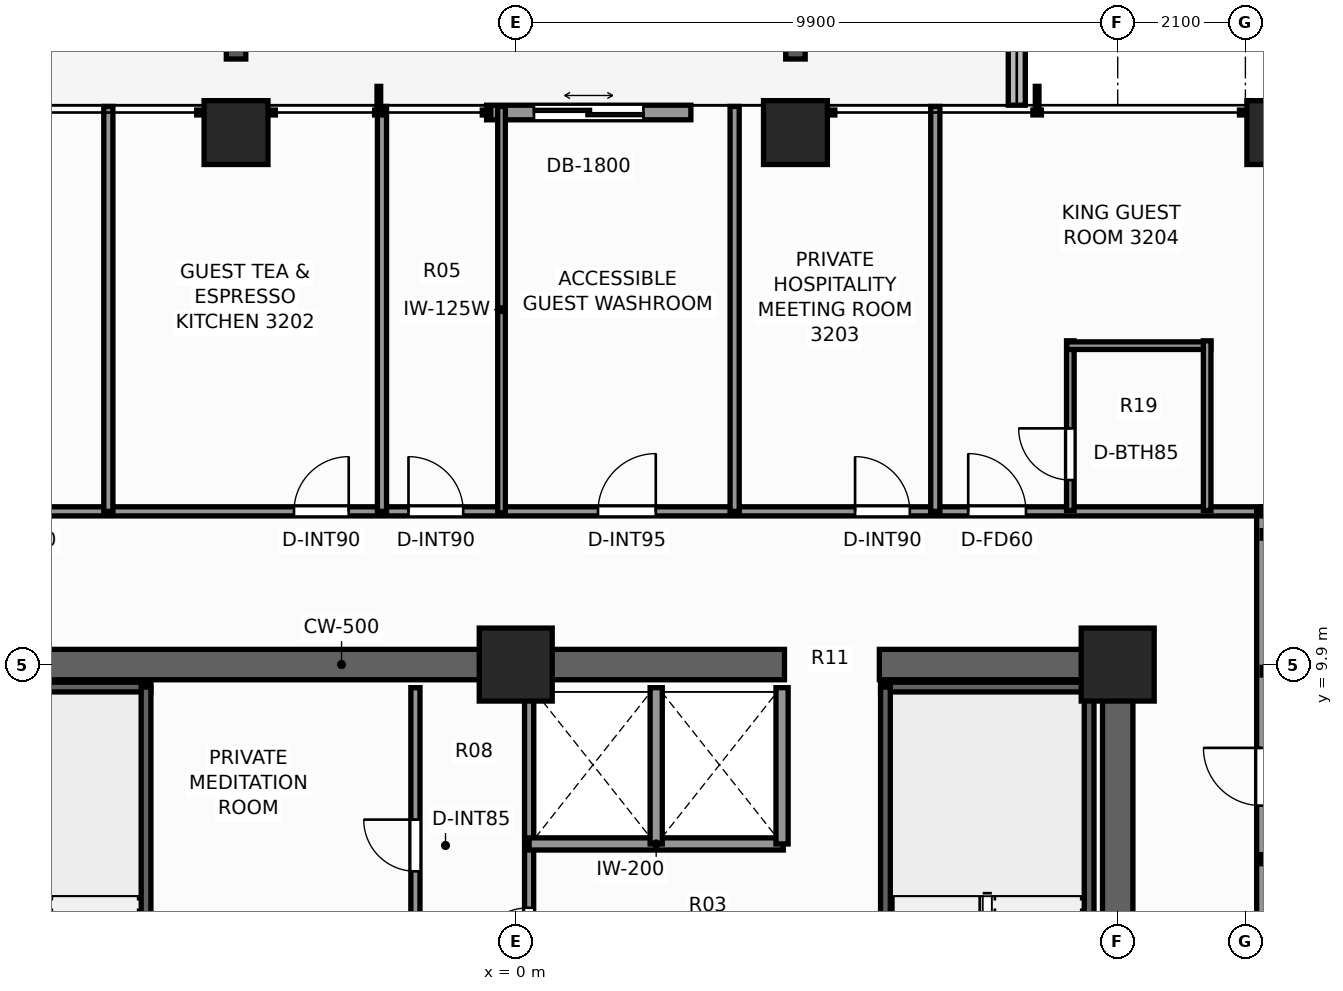
"""IFC4 building model, lengths in metres.
Left out: names, types, materials, properties, quantities, classifications, styles, units other than length and angle.
Written with IfcOpenShell. Run it as: python <this file> out.ifc"""

import sys

from ifc_helpers import new_model, si_unit, direction, frame, frame_2d, origin, origin_2d, place, context, subcontext, project, spatial, rectangle, extrude, element, fill, save


model = new_model("IFC4")
c1 = context("Model", 3, precision=1e-05, world=origin(), true_north=direction((0.0, 1.0)))
c2 = subcontext(c1, "Body", "Model", "MODEL_VIEW")
j1 = project(units=[si_unit("LENGTHUNIT", "METRE"), si_unit("PLANEANGLEUNIT", "RADIAN")], contexts=[c1])
p1 = place(None, origin())
s1 = spatial("IfcSite", under=j1, at=p1, CompositionType="ELEMENT")
p2 = place(p1, origin())
s2 = spatial("IfcBuilding", under=s1, at=p2, CompositionType="ELEMENT")
p3 = place(p2, frame((0.0, 0.0, 111.8)))
s3 = spatial("IfcBuildingStorey", under=s2, at=p3, CompositionType="ELEMENT", Elevation=111.8)
p4 = place(p3, frame((-10.15, 9.9, 0.0), z_axis=(0.0, 0.0, 1.0), x_axis=(1.0, 0.0, 0.0)))
e1 = element("IfcWall", 1, at=p4, inside=s3, PredefinedType="SHEAR", context=c2, shape_type="SweptSolid", body=[
    extrude(rectangle(XDim=14.57, YDim=0.5, at=frame_2d((7.285, 0.0))), origin(), (0.0, 0.0, 1.0), 3.3),
])
p5 = place(p3, frame((5.98, 9.9, 0.0), z_axis=(0.0, 0.0, 1.0), x_axis=(1.0, 0.0, 0.0)))
e2 = element("IfcWall", 2, at=p5, inside=s3, PredefinedType="SHEAR", context=c2, shape_type="SweptSolid", body=[
    extrude(rectangle(XDim=4.17, YDim=0.5, at=frame_2d((2.085, 0.0))), origin(), (0.0, 0.0, 1.0), 3.3),
])
p6 = place(p3, frame((9.9, -3.7, 0.0), z_axis=(0.0, 0.0, 1.0), x_axis=(0.0, 1.0, 0.0)))
e3 = element("IfcWall", 3, at=p6, inside=s3, PredefinedType="SHEAR", context=c2, shape_type="SweptSolid", body=[
    extrude(rectangle(XDim=13.35, YDim=0.5, at=frame_2d((6.675, 0.0))), origin(), (0.0, 0.0, 1.0), 3.3),
])
p7 = place(p6, frame((0.35, 0.0, 0.0)))
e4 = element("IfcOpeningElement", 4, at=p7, cuts=e3, PredefinedType="OPENING", context=c2, shape_type="SweptSolid", body=[
    extrude(rectangle(XDim=1.1, YDim=2.2, at=frame_2d((0.55, 1.1))), frame((0.0, 0.26, 0.0), z_axis=(0.0, -1.0, 0.0), x_axis=(1.0, 0.0, 0.0)), (0.0, 0.0, 1.0), 0.52),
])
for number, where, z_axis, x_axis in (
    (5, (9.9, 9.9, 0.0), (0.0, 0.0, 1.0), (1.0, 0.0, 0.0)),
    (6, (0.0, 9.9, 0.0), (0.0, 0.0, 1.0), (1.0, 0.0, 0.0)),
):
    element("IfcColumn", number, at=place(p3, frame(where, z_axis=z_axis, x_axis=x_axis)), inside=s3, PredefinedType="COLUMN", context=c2, shape_type="SweptSolid", body=[
        extrude(rectangle(XDim=1.2, YDim=1.2, at=origin_2d()), origin(), (0.0, 0.0, 1.0), 3.3),
    ])
for number, where, z_axis, x_axis in (
    (7, (-4.6, 18.65, 0.0), (0.0, 0.0, 1.0), (1.0, 0.0, 0.0)),
    (8, (4.6, 18.65, 0.0), (0.0, 0.0, 1.0), (1.0, 0.0, 0.0)),
    (9, (12.55, 18.65, 0.0), (0.0, 0.0, 1.0), (1.0, 0.0, 0.0)),
):
    element("IfcColumn", number, at=place(p3, frame(where, z_axis=z_axis, x_axis=x_axis)), inside=s3, PredefinedType="COLUMN", context=c2, shape_type="SweptSolid", body=[
        extrude(rectangle(XDim=1.05, YDim=1.05, at=origin_2d()), origin(), (0.0, 0.0, 1.0), 3.3),
    ])
p8 = place(p3, frame((8.24, 19.1, -0.04), z_axis=(0.0, 0.0, 1.0), x_axis=(0.0, 1.0, 0.0)))
e10 = element("IfcWall", 10, at=p8, inside=s3, PredefinedType="PARAPET", context=c2, shape_type="SweptSolid", body=[
    extrude(rectangle(XDim=3.42, YDim=0.28, at=frame_2d((1.71, 0.0))), origin(), (0.0, 0.0, 1.0), 0.42),
])
p9 = place(p3, frame((-0.48, 18.98, 0.0), z_axis=(0.0, 0.0, 1.0), x_axis=(1.0, 0.0, 0.0)))
e11 = element("IfcWall", 11, at=p9, inside=s3, PredefinedType="STANDARD", context=c2, shape_type="SweptSolid", body=[
    extrude(rectangle(XDim=3.36, YDim=0.24, at=frame_2d((1.68, 0.0))), origin(), (0.0, 0.0, 1.0), 3.08),
])
p10 = place(p9, frame((0.78, 0.0, 0.0)))
e12 = element("IfcOpeningElement", 12, at=p10, cuts=e11, PredefinedType="OPENING", context=c2, shape_type="SweptSolid", body=[
    extrude(rectangle(XDim=1.8, YDim=2.2, at=frame_2d((0.9, 1.1))), frame((0.0, 0.13, 0.0), z_axis=(0.0, -1.0, 0.0), x_axis=(1.0, 0.0, 0.0)), (0.0, 0.0, 1.0), 0.26),
])
p11 = place(p3, frame((-9.52, 9.53, 0.0), z_axis=(0.0, 0.0, 1.0), x_axis=(1.0, 0.0, 0.0)))
e13 = element("IfcWall", 13, at=p11, inside=s3, PredefinedType="SHEAR", context=c2, shape_type="SweptSolid", body=[
    extrude(rectangle(XDim=3.52, YDim=0.16, at=frame_2d((1.76, 0.0))), origin(), (0.0, 0.0, 1.0), 3.3),
])
p12 = place(p3, frame((-6.08, 1.97, 0.0), z_axis=(0.0, 0.0, 1.0), x_axis=(0.0, 1.0, 0.0)))
e14 = element("IfcWall", 14, at=p12, inside=s3, PredefinedType="SHEAR", context=c2, shape_type="SweptSolid", body=[
    extrude(rectangle(XDim=7.56, YDim=0.16, at=frame_2d((3.78, 0.0))), origin(), (0.0, 0.0, 1.0), 3.3),
])
p13 = place(p3, frame((6.0, 9.53, 0.0), z_axis=(0.0, 0.0, 1.0), x_axis=(1.0, 0.0, 0.0)))
e15 = element("IfcWall", 15, at=p13, inside=s3, PredefinedType="SHEAR", context=c2, shape_type="SweptSolid", body=[
    extrude(rectangle(XDim=3.52, YDim=0.16, at=frame_2d((1.76, 0.0))), origin(), (0.0, 0.0, 1.0), 3.3),
])
for number, where, z_axis, x_axis in (
    (16, (6.08, 1.97, 0.0), (0.0, 0.0, 1.0), (0.0, 1.0, 0.0)),
    (17, (9.43, 1.97, 0.0), (0.0, 0.0, 1.0), (0.0, 1.0, 0.0)),
):
    element("IfcWall", number, at=place(p3, frame(where, z_axis=z_axis, x_axis=x_axis)), inside=s3, PredefinedType="SHEAR", context=c2, shape_type="SweptSolid", body=[
        extrude(rectangle(XDim=7.56, YDim=0.16, at=frame_2d((3.78, 0.0))), origin(), (0.0, 0.0, 1.0), 3.3),
    ])
p14 = place(p3, frame((0.22, 4.3, 0.0), z_axis=(0.0, 0.0, 1.0), x_axis=(0.0, 1.0, 0.0)))
e18 = element("IfcWall", 18, at=p14, inside=s3, PredefinedType="PARTITIONING", context=c2, shape_type="SweptSolid", body=[
    extrude(rectangle(XDim=5.22, YDim=0.15, at=frame_2d((2.61, 0.0))), origin(), (0.0, 0.0, 1.0), 3.08),
])
p15 = place(p14, frame((0.65, 0.0, 0.0)))
e19 = element("IfcOpeningElement", 19, at=p15, cuts=e18, PredefinedType="OPENING", context=c2, shape_type="SweptSolid", body=[
    extrude(rectangle(XDim=0.95, YDim=2.06, at=frame_2d((0.475, 1.03))), frame((0.0, 0.085, 0.0), z_axis=(0.0, -1.0, 0.0), x_axis=(1.0, 0.0, 0.0)), (0.0, 0.0, 1.0), 0.17),
])
p16 = place(p3, frame((-1.65, 4.3, 0.0), z_axis=(0.0, 0.0, 1.0), x_axis=(0.0, 1.0, 0.0)))
e20 = element("IfcWall", 20, at=p16, inside=s3, PredefinedType="PARTITIONING", context=c2, shape_type="SweptSolid", body=[
    extrude(rectangle(XDim=5.22, YDim=0.15, at=frame_2d((2.61, 0.0))), origin(), (0.0, 0.0, 1.0), 3.08),
])
p17 = place(p16, frame((2.2, 0.0, 0.0)))
e21 = element("IfcOpeningElement", 21, at=p17, cuts=e20, PredefinedType="OPENING", context=c2, shape_type="SweptSolid", body=[
    extrude(rectangle(XDim=0.85, YDim=2.03, at=frame_2d((0.425, 1.015))), frame((0.0, 0.085, 0.0), z_axis=(0.0, -1.0, 0.0), x_axis=(1.0, 0.0, 0.0)), (0.0, 0.0, 1.0), 0.17),
])
p18 = place(p16, frame((0.25, 0.0, 0.0)))
e22 = element("IfcOpeningElement", 22, at=p18, cuts=e20, PredefinedType="OPENING", context=c2, shape_type="SweptSolid", body=[
    extrude(rectangle(XDim=0.85, YDim=2.03, at=frame_2d((0.425, 1.015))), frame((0.0, 0.085, 0.0), z_axis=(0.0, -1.0, 0.0), x_axis=(1.0, 0.0, 0.0)), (0.0, 0.0, 1.0), 0.17),
])
p19 = place(p3, frame((0.22, 6.95, 0.0), z_axis=(0.0, 0.0, 1.0), x_axis=(1.0, 0.0, 0.0)))
e23 = element("IfcWall", 23, at=p19, inside=s3, PredefinedType="SOLIDWALL", context=c2, shape_type="SweptSolid", body=[
    extrude(rectangle(XDim=4.18, YDim=0.2, at=frame_2d((2.09, 0.0))), origin(), (0.0, 0.0, 1.0), 3.08),
])
for number, where, z_axis, x_axis in (
    (24, (4.38, 6.95, 0.0), (0.0, 0.0, 1.0), (0.0, 1.0, 0.0)),
    (25, (2.31, 6.95, 0.0), (0.0, 0.0, 1.0), (0.0, 1.0, 0.0)),
):
    element("IfcWall", number, at=place(p3, frame(where, z_axis=z_axis, x_axis=x_axis)), inside=s3, PredefinedType="SOLIDWALL", context=c2, shape_type="SweptSolid", body=[
        extrude(rectangle(XDim=2.57, YDim=0.2, at=frame_2d((1.285, 0.0))), origin(), (0.0, 0.0, 1.0), 3.08),
    ])
p20 = place(p3, frame((-12.42, 12.42, 0.0), z_axis=(0.0, 0.0, 1.0), x_axis=(1.0, 0.0, 0.0)))
e26 = element("IfcWall", 26, at=p20, inside=s3, PredefinedType="PARTITIONING", context=c2, shape_type="SweptSolid", body=[
    extrude(rectangle(XDim=24.68, YDim=0.15, at=frame_2d((12.34, 0.0))), origin(), (0.0, 0.0, 1.0), 2.292),
])
p21 = place(p20, frame((3.781, 0.0, 0.0)))
e27 = element("IfcOpeningElement", 27, at=p21, cuts=e26, PredefinedType="OPENING", context=c2, shape_type="SweptSolid", body=[
    extrude(rectangle(XDim=0.9, YDim=2.06, at=frame_2d((0.45, 1.03))), frame((0.0, 0.085, 0.0), z_axis=(0.0, -1.0, 0.0), x_axis=(1.0, 0.0, 0.0)), (0.0, 0.0, 1.0), 0.17),
])
p22 = place(p20, frame((8.773, 0.0, 0.0)))
e28 = element("IfcOpeningElement", 28, at=p22, cuts=e26, PredefinedType="OPENING", context=c2, shape_type="SweptSolid", body=[
    extrude(rectangle(XDim=0.9, YDim=2.06, at=frame_2d((0.45, 1.03))), frame((0.0, 0.085, 0.0), z_axis=(0.0, -1.0, 0.0), x_axis=(1.0, 0.0, 0.0)), (0.0, 0.0, 1.0), 0.17),
])
p23 = place(p20, frame((10.656, 0.0, 0.0)))
e29 = element("IfcOpeningElement", 29, at=p23, cuts=e26, PredefinedType="OPENING", context=c2, shape_type="SweptSolid", body=[
    extrude(rectangle(XDim=0.9, YDim=2.06, at=frame_2d((0.45, 1.03))), frame((0.0, 0.085, 0.0), z_axis=(0.0, -1.0, 0.0), x_axis=(1.0, 0.0, 0.0)), (0.0, 0.0, 1.0), 0.17),
])
p24 = place(p20, frame((13.773, 0.0, 0.0)))
e30 = element("IfcOpeningElement", 30, at=p24, cuts=e26, PredefinedType="OPENING", context=c2, shape_type="SweptSolid", body=[
    extrude(rectangle(XDim=0.95, YDim=2.06, at=frame_2d((0.475, 1.03))), frame((0.0, 0.085, 0.0), z_axis=(0.0, -1.0, 0.0), x_axis=(1.0, 0.0, 0.0)), (0.0, 0.0, 1.0), 0.17),
])
p25 = place(p20, frame((18.0, 0.0, 0.0)))
e31 = element("IfcOpeningElement", 31, at=p25, cuts=e26, PredefinedType="OPENING", context=c2, shape_type="SweptSolid", body=[
    extrude(rectangle(XDim=0.9, YDim=2.06, at=frame_2d((0.45, 1.03))), frame((0.0, 0.085, 0.0), z_axis=(0.0, -1.0, 0.0), x_axis=(1.0, 0.0, 0.0)), (0.0, 0.0, 1.0), 0.17),
])
p26 = place(p20, frame((19.861, 0.0, 0.0)))
e32 = element("IfcOpeningElement", 32, at=p26, cuts=e26, PredefinedType="OPENING", context=c2, shape_type="SweptSolid", body=[
    extrude(rectangle(XDim=0.95, YDim=2.06, at=frame_2d((0.475, 1.03))), frame((0.0, 0.085, 0.0), z_axis=(0.0, -1.0, 0.0), x_axis=(1.0, 0.0, 0.0)), (0.0, 0.0, 1.0), 0.17),
])
p27 = place(p3, frame((12.26, -12.42, 0.0), z_axis=(0.0, 0.0, 1.0), x_axis=(0.0, 1.0, 0.0)))
e33 = element("IfcWall", 33, at=p27, inside=s3, PredefinedType="PARTITIONING", context=c2, shape_type="SweptSolid", body=[
    extrude(rectangle(XDim=24.84, YDim=0.15, at=frame_2d((12.42, 0.0))), origin(), (0.0, 0.0, 1.0), 2.292),
])
p28 = place(p27, frame((3.373, 0.0, 0.0)))
e34 = element("IfcOpeningElement", 34, at=p28, cuts=e33, PredefinedType="OPENING", context=c2, shape_type="SweptSolid", body=[
    extrude(rectangle(XDim=0.95, YDim=2.06, at=frame_2d((0.475, 1.03))), frame((0.0, 0.085, 0.0), z_axis=(0.0, -1.0, 0.0), x_axis=(1.0, 0.0, 0.0)), (0.0, 0.0, 1.0), 0.17),
])
p29 = place(p27, frame((5.593, 0.0, 0.0)))
e35 = element("IfcOpeningElement", 35, at=p29, cuts=e33, PredefinedType="OPENING", context=c2, shape_type="SweptSolid", body=[
    extrude(rectangle(XDim=0.95, YDim=2.06, at=frame_2d((0.475, 1.03))), frame((0.0, 0.085, 0.0), z_axis=(0.0, -1.0, 0.0), x_axis=(1.0, 0.0, 0.0)), (0.0, 0.0, 1.0), 0.17),
])
p30 = place(p27, frame((13.981, 0.0, 0.0)))
e36 = element("IfcOpeningElement", 36, at=p30, cuts=e33, PredefinedType="OPENING", context=c2, shape_type="SweptSolid", body=[
    extrude(rectangle(XDim=0.95, YDim=2.06, at=frame_2d((0.475, 1.03))), frame((0.0, 0.085, 0.0), z_axis=(0.0, -1.0, 0.0), x_axis=(1.0, 0.0, 0.0)), (0.0, 0.0, 1.0), 0.17),
])
p31 = place(p27, frame((16.886, 0.0, 0.0)))
e37 = element("IfcOpeningElement", 37, at=p31, cuts=e33, PredefinedType="OPENING", context=c2, shape_type="SweptSolid", body=[
    extrude(rectangle(XDim=0.9, YDim=2.06, at=frame_2d((0.45, 1.03))), frame((0.0, 0.085, 0.0), z_axis=(0.0, -1.0, 0.0), x_axis=(1.0, 0.0, 0.0)), (0.0, 0.0, 1.0), 0.17),
])
p32 = place(p27, frame((20.0, 0.0, 0.0)))
e38 = element("IfcOpeningElement", 38, at=p32, cuts=e33, PredefinedType="OPENING", context=c2, shape_type="SweptSolid", body=[
    extrude(rectangle(XDim=0.95, YDim=2.06, at=frame_2d((0.475, 1.03))), frame((0.0, 0.085, 0.0), z_axis=(0.0, -1.0, 0.0), x_axis=(1.0, 0.0, 0.0)), (0.0, 0.0, 1.0), 0.17),
])
p33 = place(p3, frame((12.26, 12.42, 0.0), z_axis=(0.0, 0.0, 1.0), x_axis=(1.0, 0.0, 0.0)))
e39 = element("IfcWall", 39, at=p33, inside=s3, PredefinedType="PARTITIONING", context=c2, shape_type="SweptSolid", body=[
    extrude(rectangle(XDim=6.82, YDim=0.15, at=frame_2d((3.41, 0.0))), origin(), (0.0, 0.0, 1.0), 2.292),
])
for number, where, z_axis, x_axis in (
    (40, (-6.7, 12.42, 0.0), (0.0, 0.0, 1.0), (0.0, 1.0, 0.0)),
    (41, (-2.2, 12.42, 0.0), (0.0, 0.0, 1.0), (0.0, 1.0, 0.0)),
    (42, (3.6, 12.42, 0.0), (0.0, 0.0, 1.0), (0.0, 1.0, 0.0)),
):
    element("IfcWall", number, at=place(p3, frame(where, z_axis=z_axis, x_axis=x_axis)), inside=s3, PredefinedType="PARTITIONING", context=c2, shape_type="SweptSolid", body=[
        extrude(rectangle(XDim=6.66, YDim=0.15, at=frame_2d((3.33, 0.0))), origin(), (0.0, 0.0, 1.0), 2.449),
    ])
p34 = place(p3, frame((-0.234, 12.395, 0.0), z_axis=(0.0, 0.0, 1.0), x_axis=(0.0, 1.0, 0.0)))
e43 = element("IfcWall", 43, at=p34, inside=s3, PredefinedType="PARTITIONING", context=c2, shape_type="SweptSolid", body=[
    extrude(rectangle(XDim=6.685, YDim=0.125, at=frame_2d((3.343, 0.0))), origin(), (0.0, 0.0, 1.0), 2.449),
])
p35 = place(p3, frame((6.9, 12.42, 0.0), z_axis=(0.0, 0.0, 1.0), x_axis=(0.0, 1.0, 0.0)))
e44 = element("IfcWall", 44, at=p35, inside=s3, PredefinedType="PARTITIONING", context=c2, shape_type="SweptSolid", body=[
    extrude(rectangle(XDim=6.66, YDim=0.15, at=frame_2d((3.33, 0.0))), origin(), (0.0, 0.0, 1.0), 2.449),
])
p36 = place(p3, frame((9.121, 12.435, 0.0), z_axis=(0.0, 0.0, 1.0), x_axis=(0.0, 1.0, 0.0)))
e45 = element("IfcWall", 45, at=p36, inside=s3, PredefinedType="PARTITIONING", context=c2, shape_type="SweptSolid", body=[
    extrude(rectangle(XDim=2.79, YDim=0.125, at=frame_2d((1.395, 0.0))), origin(), (0.0, 0.0, 1.0), 3.08),
])
p37 = place(p36, frame((0.5, 0.0, 0.0)))
e46 = element("IfcOpeningElement", 46, at=p37, cuts=e45, PredefinedType="OPENING", context=c2, shape_type="SweptSolid", body=[
    extrude(rectangle(XDim=0.85, YDim=2.03, at=frame_2d((0.425, 1.015))), frame((0.0, 0.073, 0.0), z_axis=(0.0, -1.0, 0.0), x_axis=(1.0, 0.0, 0.0)), (0.0, 0.0, 1.0), 0.145),
])
p38 = place(p3, frame((9.061, 15.145, 0.0), z_axis=(0.0, 0.0, 1.0), x_axis=(1.0, 0.0, 0.0)))
e47 = element("IfcWall", 47, at=p38, inside=s3, PredefinedType="PARTITIONING", context=c2, shape_type="SweptSolid", body=[
    extrude(rectangle(XDim=2.37, YDim=0.125, at=frame_2d((1.185, 0.0))), origin(), (0.0, 0.0, 1.0), 2.292),
])
p39 = place(p3, frame((11.371, 12.435, 0.0), z_axis=(0.0, 0.0, 1.0), x_axis=(0.0, 1.0, 0.0)))
e48 = element("IfcWall", 48, at=p39, inside=s3, PredefinedType="PARTITIONING", context=c2, shape_type="SweptSolid", body=[
    extrude(rectangle(XDim=2.79, YDim=0.125, at=frame_2d((1.395, 0.0))), origin(), (0.0, 0.0, 1.0), 2.292),
])
p40 = place(p3, frame((12.26, 6.7, 0.0), z_axis=(0.0, 0.0, 1.0), x_axis=(1.0, 0.0, 0.0)))
e49 = element("IfcWall", 49, at=p40, inside=s3, PredefinedType="PARTITIONING", context=c2, shape_type="SweptSolid", body=[
    extrude(rectangle(XDim=6.82, YDim=0.15, at=frame_2d((3.41, 0.0))), origin(), (0.0, 0.0, 1.0), 2.449),
])
p41 = place(p3, frame((12.275, 9.791, 0.0), z_axis=(0.0, 0.0, 1.0), x_axis=(1.0, 0.0, 0.0)))
e50 = element("IfcWall", 50, at=p41, inside=s3, PredefinedType="PARTITIONING", context=c2, shape_type="SweptSolid", body=[
    extrude(rectangle(XDim=2.79, YDim=0.125, at=frame_2d((1.395, 0.0))), origin(), (0.0, 0.0, 1.0), 3.08),
])
p42 = place(p41, frame((0.5, 0.0, 0.0)))
e51 = element("IfcOpeningElement", 51, at=p42, cuts=e50, PredefinedType="OPENING", context=c2, shape_type="SweptSolid", body=[
    extrude(rectangle(XDim=0.85, YDim=2.03, at=frame_2d((0.425, 1.015))), frame((0.0, 0.073, 0.0), z_axis=(0.0, -1.0, 0.0), x_axis=(1.0, 0.0, 0.0)), (0.0, 0.0, 1.0), 0.145),
])
p43 = place(p3, frame((12.275, 12.041, 0.0), z_axis=(0.0, 0.0, 1.0), x_axis=(1.0, 0.0, 0.0)))
e52 = element("IfcWall", 52, at=p43, inside=s3, PredefinedType="PARTITIONING", context=c2, shape_type="SweptSolid", body=[
    extrude(rectangle(XDim=2.79, YDim=0.125, at=frame_2d((1.395, 0.0))), origin(), (0.0, 0.0, 1.0), 3.08),
])
p44 = place(p10, origin())
e53 = element("IfcDoor", 53, at=p44, inside=s3, OperationType="DOUBLE_DOOR_SLIDING", PredefinedType="DOOR", context=c2, shape_type="SweptSolid", body=[
    extrude(rectangle(XDim=1.8, YDim=2.2, at=frame_2d((0.9, 1.1))), frame((0.0, 0.025, 0.0), z_axis=(0.0, -1.0, 0.0), x_axis=(1.0, 0.0, 0.0)), (0.0, 0.0, 1.0), 0.05),
])
fill(e12, e53)
p45 = place(p15, origin())
e54 = element("IfcDoor", 54, at=p45, inside=s3, OperationType="SINGLE_SWING_LEFT", PredefinedType="DOOR", context=c2, shape_type="SweptSolid", body=[
    extrude(rectangle(XDim=0.95, YDim=2.06, at=frame_2d((0.475, 1.03))), frame((0.0, 0.025, 0.0), z_axis=(0.0, -1.0, 0.0), x_axis=(1.0, 0.0, 0.0)), (0.0, 0.0, 1.0), 0.05),
])
fill(e19, e54)
p46 = place(p17, origin())
e55 = element("IfcDoor", 55, at=p46, inside=s3, OperationType="SINGLE_SWING_RIGHT", PredefinedType="DOOR", context=c2, shape_type="SweptSolid", body=[
    extrude(rectangle(XDim=0.85, YDim=2.03, at=frame_2d((0.425, 1.015))), frame((0.0, 0.025, 0.0), z_axis=(0.0, -1.0, 0.0), x_axis=(1.0, 0.0, 0.0)), (0.0, 0.0, 1.0), 0.05),
])
fill(e21, e55)
p47 = place(p22, origin())
e56 = element("IfcDoor", 56, at=p47, inside=s3, OperationType="SINGLE_SWING_RIGHT", PredefinedType="DOOR", context=c2, shape_type="SweptSolid", body=[
    extrude(rectangle(XDim=0.9, YDim=2.06, at=frame_2d((0.45, 1.03))), frame((0.0, 0.025, 0.0), z_axis=(0.0, -1.0, 0.0), x_axis=(1.0, 0.0, 0.0)), (0.0, 0.0, 1.0), 0.05),
])
fill(e28, e56)
p48 = place(p23, origin())
e57 = element("IfcDoor", 57, at=p48, inside=s3, OperationType="SINGLE_SWING_LEFT", PredefinedType="DOOR", context=c2, shape_type="SweptSolid", body=[
    extrude(rectangle(XDim=0.9, YDim=2.06, at=frame_2d((0.45, 1.03))), frame((0.0, 0.025, 0.0), z_axis=(0.0, -1.0, 0.0), x_axis=(1.0, 0.0, 0.0)), (0.0, 0.0, 1.0), 0.05),
])
fill(e29, e57)
p49 = place(p24, origin())
e58 = element("IfcDoor", 58, at=p49, inside=s3, OperationType="SINGLE_SWING_RIGHT", PredefinedType="DOOR", context=c2, shape_type="SweptSolid", body=[
    extrude(rectangle(XDim=0.95, YDim=2.06, at=frame_2d((0.475, 1.03))), frame((0.0, 0.025, 0.0), z_axis=(0.0, -1.0, 0.0), x_axis=(1.0, 0.0, 0.0)), (0.0, 0.0, 1.0), 0.05),
])
fill(e30, e58)
p50 = place(p25, origin())
e59 = element("IfcDoor", 59, at=p50, inside=s3, OperationType="SINGLE_SWING_LEFT", PredefinedType="DOOR", context=c2, shape_type="SweptSolid", body=[
    extrude(rectangle(XDim=0.9, YDim=2.06, at=frame_2d((0.45, 1.03))), frame((0.0, 0.025, 0.0), z_axis=(0.0, -1.0, 0.0), x_axis=(1.0, 0.0, 0.0)), (0.0, 0.0, 1.0), 0.05),
])
fill(e31, e59)
p51 = place(p37, origin())
e60 = element("IfcDoor", 60, at=p51, inside=s3, OperationType="SINGLE_SWING_RIGHT", PredefinedType="DOOR", context=c2, shape_type="SweptSolid", body=[
    extrude(rectangle(XDim=0.85, YDim=2.03, at=frame_2d((0.425, 1.015))), frame((0.0, 0.025, 0.0), z_axis=(0.0, -1.0, 0.0), x_axis=(1.0, 0.0, 0.0)), (0.0, 0.0, 1.0), 0.05),
])
fill(e46, e60)
p52 = place(p26, origin())
e61 = element("IfcDoor", 61, at=p52, inside=s3, OperationType="SINGLE_SWING_LEFT", PredefinedType="DOOR", context=c2, shape_type="SweptSolid", body=[
    extrude(rectangle(XDim=0.95, YDim=2.06, at=frame_2d((0.475, 1.03))), frame((0.0, 0.025, 0.0), z_axis=(0.0, -1.0, 0.0), x_axis=(1.0, 0.0, 0.0)), (0.0, 0.0, 1.0), 0.05),
])
fill(e32, e61)
p53 = place(p32, origin())
e62 = element("IfcDoor", 62, at=p53, inside=s3, OperationType="SINGLE_SWING_RIGHT", PredefinedType="DOOR", context=c2, shape_type="SweptSolid", body=[
    extrude(rectangle(XDim=0.95, YDim=2.06, at=frame_2d((0.475, 1.03))), frame((0.0, 0.025, 0.0), z_axis=(0.0, -1.0, 0.0), x_axis=(1.0, 0.0, 0.0)), (0.0, 0.0, 1.0), 0.05),
])
fill(e38, e62)
save(model, sys.argv[1])
